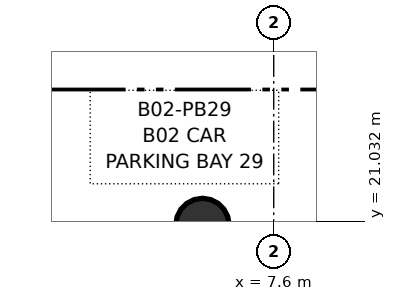
"""IFC4 building model, lengths in metres.
Left out: names, types, materials, properties, quantities, classifications, styles, units other than length and angle.
Written with IfcOpenShell. Run it as: python <this file> out.ifc"""

import sys

from ifc_helpers import new_model, si_unit, direction, frame, origin, origin_2d, place, context, subcontext, project, spatial, circle, extrude, source, transform, mapped, element, save


model = new_model("IFC4")
c1 = context("Model", 3, precision=1e-05, world=origin(), true_north=direction((0.0, 1.0)))
c2 = subcontext(c1, "Body", "Model", "MODEL_VIEW")
j1 = project(units=[si_unit("LENGTHUNIT", "METRE"), si_unit("PLANEANGLEUNIT", "RADIAN")], contexts=[c1])
p1 = place(None, origin())
s1 = spatial("IfcSite", under=j1, at=p1, CompositionType="ELEMENT")
p2 = place(p1, origin())
s2 = spatial("IfcBuilding", under=s1, at=p2, CompositionType="ELEMENT")
p3 = place(p2, frame((0.0, 0.0, -8.7)))
s3 = spatial("IfcBuildingStorey", under=s2, at=p3, CompositionType="ELEMENT", Elevation=-8.7)
m1 = source(origin(), c2, "Body", "SweptSolid", [
    extrude(circle(Radius=0.7, at=origin_2d()), origin(), (0.0, 0.0, 1.0), 4.495),
])
p4 = place(p3, frame((5.725, 20.937, 0.0), z_axis=(0.0, 0.0, 1.0), x_axis=(1.0, 0.0, 0.0)))
e1 = element("IfcColumn", 1, at=p4, inside=s3, PredefinedType="COLUMN", context=c2, shape_type="MappedRepresentation", body=[
    mapped(m1, transform((0.0, 0.0, 0.0), x_axis=(1.0, 0.0, 0.0), y_axis=(0.0, 1.0, 0.0), z_axis=(0.0, 0.0, 1.0), scale=1.0)),
])
save(model, sys.argv[1])
